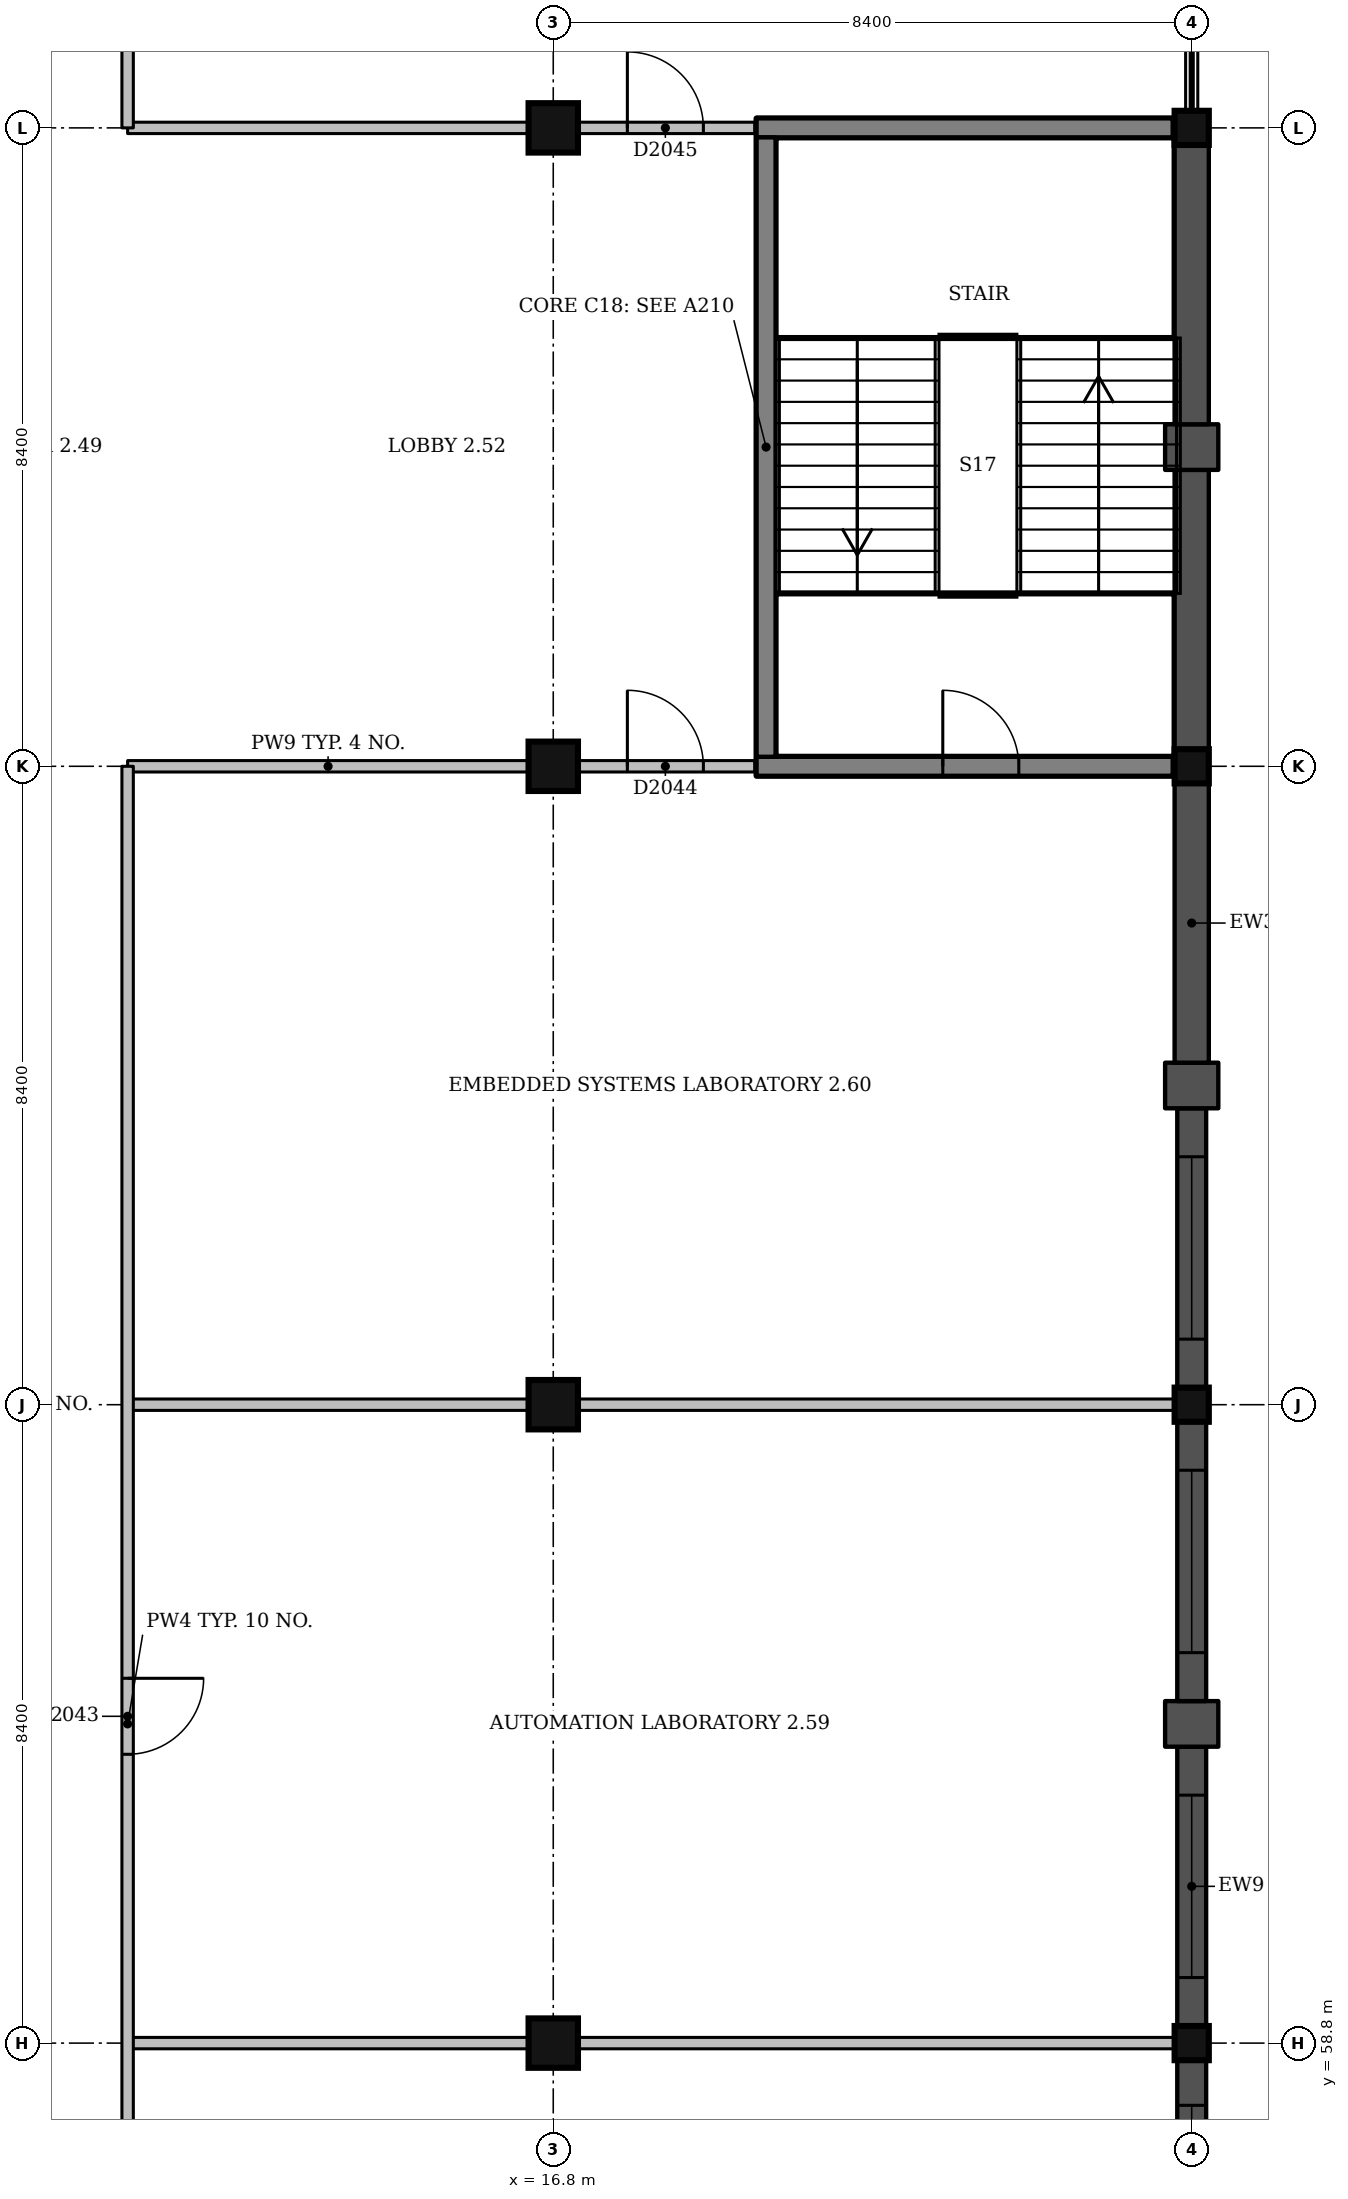
"""IFC4 building model, lengths in metres.
Left out: names, types, materials, properties, quantities, classifications, styles, units other than length and angle.
Written with IfcOpenShell. Run it as: python <this file> out.ifc"""

import sys

from ifc_helpers import new_model, si_unit, direction, frame, frame_2d, origin, origin_2d, place, context, subcontext, project, spatial, rectangle, extrude, element, fill, save


model = new_model("IFC4")
c1 = context("Model", 3, precision=1e-05, world=origin(), true_north=direction((0.0, 1.0)))
c2 = subcontext(c1, "Body", "Model", "MODEL_VIEW")
j1 = project(units=[si_unit("LENGTHUNIT", "METRE"), si_unit("PLANEANGLEUNIT", "RADIAN")], contexts=[c1])
p1 = place(None, origin())
s1 = spatial("IfcSite", under=j1, at=p1, CompositionType="ELEMENT")
p2 = place(p1, origin())
s2 = spatial("IfcBuilding", under=s1, at=p2, CompositionType="ELEMENT")
p3 = place(p2, frame((0.0, 0.0, 9.0)))
s3 = spatial("IfcBuildingStorey", under=s2, at=p3, CompositionType="ELEMENT", Elevation=9.0)
for number, where, z_axis, x_axis in (
    (1, (16.8, 58.8, 0.0), (0.0, 0.0, 1.0), (1.0, 0.0, 0.0)),
    (2, (16.8, 67.2, 0.0), (0.0, 0.0, 1.0), (1.0, 0.0, 0.0)),
    (3, (16.8, 75.6, 0.0), (0.0, 0.0, 1.0), (1.0, 0.0, 0.0)),
    (4, (16.8, 84.0, 0.0), (0.0, 0.0, 1.0), (1.0, 0.0, 0.0)),
):
    element("IfcColumn", number, at=place(p3, frame(where, z_axis=z_axis, x_axis=x_axis)), inside=s3, PredefinedType="COLUMN", context=c2, shape_type="SweptSolid", body=[
        extrude(rectangle(XDim=0.65, YDim=0.65, at=origin_2d()), origin(), (0.0, 0.0, 1.0), 4.5),
    ])
for number, where, z_axis, x_axis in (
    (5, (25.2, 58.8, 0.0), (0.0, 0.0, 1.0), (1.0, 0.0, 0.0)),
    (6, (25.2, 67.2, 0.0), (0.0, 0.0, 1.0), (1.0, 0.0, 0.0)),
    (7, (25.2, 75.6, 0.0), (0.0, 0.0, 1.0), (1.0, 0.0, 0.0)),
    (8, (25.2, 84.0, 0.0), (0.0, 0.0, 1.0), (1.0, 0.0, 0.0)),
):
    element("IfcColumn", number, at=place(p3, frame(where, z_axis=z_axis, x_axis=x_axis)), inside=s3, PredefinedType="COLUMN", context=c2, shape_type="SweptSolid", body=[
        extrude(rectangle(XDim=0.45, YDim=0.45, at=origin_2d()), origin(), (0.0, 0.0, 1.0), 4.5),
    ])
p4 = place(p3, frame((19.475, 75.6, 0.0), z_axis=(0.0, 0.0, 1.0), x_axis=(1.0, 0.0, 0.0)))
e9 = element("IfcWall", 9, at=p4, inside=s3, PredefinedType="SHEAR", context=c2, shape_type="SweptSolid", body=[
    extrude(rectangle(XDim=5.475, YDim=0.25, at=frame_2d((2.737, 0.0))), origin(), (0.0, 0.0, 1.0), 4.5),
])
p5 = place(p4, frame((2.45, 0.0, 0.0)))
e10 = element("IfcOpeningElement", 10, at=p5, cuts=e9, PredefinedType="OPENING", context=c2, shape_type="SweptSolid", body=[
    extrude(rectangle(XDim=1.0, YDim=2.1, at=frame_2d((0.5, 1.05))), frame((0.0, 0.135, 0.0), z_axis=(0.0, -1.0, 0.0), x_axis=(1.0, 0.0, 0.0)), (0.0, 0.0, 1.0), 0.27),
])
p6 = place(p3, frame((19.475, 84.0, 0.0), z_axis=(0.0, 0.0, 1.0), x_axis=(1.0, 0.0, 0.0)))
e11 = element("IfcWall", 11, at=p6, inside=s3, PredefinedType="SHEAR", context=c2, shape_type="SweptSolid", body=[
    extrude(rectangle(XDim=5.475, YDim=0.25, at=frame_2d((2.737, 0.0))), origin(), (0.0, 0.0, 1.0), 4.5),
])
p7 = place(p3, frame((19.6, 75.725, 0.0), z_axis=(0.0, 0.0, 1.0), x_axis=(0.0, 1.0, 0.0)))
e12 = element("IfcWall", 12, at=p7, inside=s3, PredefinedType="SHEAR", context=c2, shape_type="SweptSolid", body=[
    extrude(rectangle(XDim=8.15, YDim=0.25, at=frame_2d((4.075, 0.0))), origin(), (0.0, 0.0, 1.0), 4.5),
])
p8 = place(p3, frame((25.2, 54.988, 0.0), z_axis=(0.0, 0.0, 1.0), x_axis=(0.0, 1.0, 0.0)))
e13 = element("IfcWall", 13, at=p8, inside=s3, PredefinedType="SOLIDWALL", context=c2, shape_type="SweptSolid", body=[
    extrude(rectangle(XDim=3.587, YDim=0.38, at=frame_2d((1.794, 0.0))), origin(), (0.0, 0.0, 1.0), 4.2),
])
p9 = place(p8, frame((0.594, 0.0, 1.2)))
e14 = element("IfcOpeningElement", 14, at=p9, cuts=e13, PredefinedType="OPENING", context=c2, shape_type="SweptSolid", body=[
    extrude(rectangle(XDim=2.4, YDim=1.5, at=frame_2d((1.2, 0.75))), frame((0.0, 0.2, 0.0), z_axis=(0.0, -1.0, 0.0), x_axis=(1.0, 0.0, 0.0)), (0.0, 0.0, 1.0), 0.4),
])
p10 = place(p3, frame((25.2, 59.025, 0.0), z_axis=(0.0, 0.0, 1.0), x_axis=(0.0, 1.0, 0.0)))
e15 = element("IfcWall", 15, at=p10, inside=s3, PredefinedType="SOLIDWALL", context=c2, shape_type="SweptSolid", body=[
    extrude(rectangle(XDim=3.675, YDim=0.38, at=frame_2d((1.837, 0.0))), origin(), (0.0, 0.0, 1.0), 3.35),
])
p11 = place(p10, frame((0.637, 0.0, 1.2)))
e16 = element("IfcOpeningElement", 16, at=p11, cuts=e15, PredefinedType="OPENING", context=c2, shape_type="SweptSolid", body=[
    extrude(rectangle(XDim=2.4, YDim=1.5, at=frame_2d((1.2, 0.75))), frame((0.0, 0.2, 0.0), z_axis=(0.0, -1.0, 0.0), x_axis=(1.0, 0.0, 0.0)), (0.0, 0.0, 1.0), 0.4),
])
p12 = place(p3, frame((25.2, 62.7, 0.0), z_axis=(0.0, 0.0, 1.0), x_axis=(0.0, 1.0, 0.0)))
e17 = element("IfcWall", 17, at=p12, inside=s3, PredefinedType="SOLIDWALL", context=c2, shape_type="SweptSolid", body=[
    extrude(rectangle(XDim=0.6, YDim=0.7, at=frame_2d((0.3, 0.0))), origin(), (0.0, 0.0, 1.0), 3.35),
])
p13 = place(p3, frame((25.2, 63.3, 0.0), z_axis=(0.0, 0.0, 1.0), x_axis=(0.0, 1.0, 0.0)))
e18 = element("IfcWall", 18, at=p13, inside=s3, PredefinedType="SOLIDWALL", context=c2, shape_type="SweptSolid", body=[
    extrude(rectangle(XDim=3.675, YDim=0.38, at=frame_2d((1.837, 0.0))), origin(), (0.0, 0.0, 1.0), 3.35),
])
p14 = place(p13, frame((0.637, 0.0, 1.2)))
e19 = element("IfcOpeningElement", 19, at=p14, cuts=e18, PredefinedType="OPENING", context=c2, shape_type="SweptSolid", body=[
    extrude(rectangle(XDim=2.4, YDim=1.5, at=frame_2d((1.2, 0.75))), frame((0.0, 0.2, 0.0), z_axis=(0.0, -1.0, 0.0), x_axis=(1.0, 0.0, 0.0)), (0.0, 0.0, 1.0), 0.4),
])
p15 = place(p3, frame((25.2, 67.425, 0.0), z_axis=(0.0, 0.0, 1.0), x_axis=(0.0, 1.0, 0.0)))
e20 = element("IfcWall", 20, at=p15, inside=s3, PredefinedType="SOLIDWALL", context=c2, shape_type="SweptSolid", body=[
    extrude(rectangle(XDim=3.675, YDim=0.38, at=frame_2d((1.837, 0.0))), origin(), (0.0, 0.0, 1.0), 3.35),
])
p16 = place(p15, frame((0.637, 0.0, 1.2)))
e21 = element("IfcOpeningElement", 21, at=p16, cuts=e20, PredefinedType="OPENING", context=c2, shape_type="SweptSolid", body=[
    extrude(rectangle(XDim=2.4, YDim=1.5, at=frame_2d((1.2, 0.75))), frame((0.0, 0.2, 0.0), z_axis=(0.0, -1.0, 0.0), x_axis=(1.0, 0.0, 0.0)), (0.0, 0.0, 1.0), 0.4),
])
p17 = place(p3, frame((25.2, 71.1, 0.0), z_axis=(0.0, 0.0, 1.0), x_axis=(0.0, 1.0, 0.0)))
e22 = element("IfcWall", 22, at=p17, inside=s3, PredefinedType="SOLIDWALL", context=c2, shape_type="SweptSolid", body=[
    extrude(rectangle(XDim=0.6, YDim=0.7, at=frame_2d((0.3, 0.0))), origin(), (0.0, 0.0, 1.0), 3.35),
])
p18 = place(p3, frame((25.2, 71.7, 0.0), z_axis=(0.0, 0.0, 1.0), x_axis=(0.0, 1.0, 0.0)))
e23 = element("IfcWall", 23, at=p18, inside=s3, PredefinedType="SOLIDWALL", context=c2, shape_type="SweptSolid", body=[
    extrude(rectangle(XDim=3.675, YDim=0.45, at=frame_2d((1.837, 0.0))), origin(), (0.0, 0.0, 1.0), 3.35),
])
p19 = place(p3, frame((25.2, 75.825, 0.0), z_axis=(0.0, 0.0, 1.0), x_axis=(0.0, 1.0, 0.0)))
e24 = element("IfcWall", 24, at=p19, inside=s3, PredefinedType="SOLIDWALL", context=c2, shape_type="SweptSolid", body=[
    extrude(rectangle(XDim=3.675, YDim=0.45, at=frame_2d((1.837, 0.0))), origin(), (0.0, 0.0, 1.0), 3.65),
])
p20 = place(p3, frame((25.2, 79.5, 0.0), z_axis=(0.0, 0.0, 1.0), x_axis=(0.0, 1.0, 0.0)))
e25 = element("IfcWall", 25, at=p20, inside=s3, PredefinedType="SOLIDWALL", context=c2, shape_type="SweptSolid", body=[
    extrude(rectangle(XDim=0.6, YDim=0.7, at=frame_2d((0.3, 0.0))), origin(), (0.0, 0.0, 1.0), 3.65),
])
p21 = place(p3, frame((25.2, 80.1, 0.0), z_axis=(0.0, 0.0, 1.0), x_axis=(0.0, 1.0, 0.0)))
e26 = element("IfcWall", 26, at=p21, inside=s3, PredefinedType="SOLIDWALL", context=c2, shape_type="SweptSolid", body=[
    extrude(rectangle(XDim=3.675, YDim=0.45, at=frame_2d((1.837, 0.0))), origin(), (0.0, 0.0, 1.0), 3.65),
])
p22 = place(p3, frame((11.2, 58.8, 0.0), z_axis=(0.0, 0.0, 1.0), x_axis=(1.0, 0.0, 0.0)))
e27 = element("IfcWall", 27, at=p22, inside=s3, PredefinedType="PARTITIONING", context=c2, shape_type="SweptSolid", body=[
    extrude(rectangle(XDim=5.275, YDim=0.15, at=frame_2d((2.638, 0.0))), origin(), (0.0, 0.0, 1.0), 3.4),
])
p23 = place(p3, frame((17.125, 58.8, 0.0), z_axis=(0.0, 0.0, 1.0), x_axis=(1.0, 0.0, 0.0)))
e28 = element("IfcWall", 28, at=p23, inside=s3, PredefinedType="PARTITIONING", context=c2, shape_type="SweptSolid", body=[
    extrude(rectangle(XDim=7.85, YDim=0.15, at=frame_2d((3.925, 0.0))), origin(), (0.0, 0.0, 1.0), 3.4),
])
p24 = place(p3, frame((11.2, 67.2, 0.0), z_axis=(0.0, 0.0, 1.0), x_axis=(1.0, 0.0, 0.0)))
e29 = element("IfcWall", 29, at=p24, inside=s3, PredefinedType="PARTITIONING", context=c2, shape_type="SweptSolid", body=[
    extrude(rectangle(XDim=5.275, YDim=0.15, at=frame_2d((2.638, 0.0))), origin(), (0.0, 0.0, 1.0), 3.4),
])
p25 = place(p3, frame((17.125, 67.2, 0.0), z_axis=(0.0, 0.0, 1.0), x_axis=(1.0, 0.0, 0.0)))
e30 = element("IfcWall", 30, at=p25, inside=s3, PredefinedType="PARTITIONING", context=c2, shape_type="SweptSolid", body=[
    extrude(rectangle(XDim=7.85, YDim=0.15, at=frame_2d((3.925, 0.0))), origin(), (0.0, 0.0, 1.0), 3.4),
])
p26 = place(p3, frame((11.2, 75.6, 0.0), z_axis=(0.0, 0.0, 1.0), x_axis=(1.0, 0.0, 0.0)))
e31 = element("IfcWall", 31, at=p26, inside=s3, PredefinedType="PARTITIONING", context=c2, shape_type="SweptSolid", body=[
    extrude(rectangle(XDim=5.275, YDim=0.15, at=frame_2d((2.638, 0.0))), origin(), (0.0, 0.0, 1.0), 3.4),
])
p27 = place(p3, frame((17.125, 75.6, 0.0), z_axis=(0.0, 0.0, 1.0), x_axis=(1.0, 0.0, 0.0)))
e32 = element("IfcWall", 32, at=p27, inside=s3, PredefinedType="PARTITIONING", context=c2, shape_type="SweptSolid", body=[
    extrude(rectangle(XDim=2.325, YDim=0.15, at=frame_2d((1.163, 0.0))), origin(), (0.0, 0.0, 1.0), 3.5),
])
p28 = place(p27, frame((0.65, 0.0, 0.0)))
e33 = element("IfcOpeningElement", 33, at=p28, cuts=e32, PredefinedType="OPENING", context=c2, shape_type="SweptSolid", body=[
    extrude(rectangle(XDim=1.0, YDim=2.1, at=frame_2d((0.5, 1.05))), frame((0.0, 0.085, 0.0), z_axis=(0.0, -1.0, 0.0), x_axis=(1.0, 0.0, 0.0)), (0.0, 0.0, 1.0), 0.17),
])
p29 = place(p3, frame((11.2, 84.0, 0.0), z_axis=(0.0, 0.0, 1.0), x_axis=(1.0, 0.0, 0.0)))
e34 = element("IfcWall", 34, at=p29, inside=s3, PredefinedType="PARTITIONING", context=c2, shape_type="SweptSolid", body=[
    extrude(rectangle(XDim=5.275, YDim=0.15, at=frame_2d((2.638, 0.0))), origin(), (0.0, 0.0, 1.0), 3.4),
])
p30 = place(p3, frame((17.125, 84.0, 0.0), z_axis=(0.0, 0.0, 1.0), x_axis=(1.0, 0.0, 0.0)))
e35 = element("IfcWall", 35, at=p30, inside=s3, PredefinedType="PARTITIONING", context=c2, shape_type="SweptSolid", body=[
    extrude(rectangle(XDim=2.325, YDim=0.15, at=frame_2d((1.163, 0.0))), origin(), (0.0, 0.0, 1.0), 3.5),
])
p31 = place(p30, frame((0.65, 0.0, 0.0)))
e36 = element("IfcOpeningElement", 36, at=p31, cuts=e35, PredefinedType="OPENING", context=c2, shape_type="SweptSolid", body=[
    extrude(rectangle(XDim=1.0, YDim=2.1, at=frame_2d((0.5, 1.05))), frame((0.0, 0.085, 0.0), z_axis=(0.0, -1.0, 0.0), x_axis=(1.0, 0.0, 0.0)), (0.0, 0.0, 1.0), 0.17),
])
p32 = place(p3, frame((11.2, 50.4, 0.0), z_axis=(0.0, 0.0, 1.0), x_axis=(0.0, 1.0, 0.0)))
e37 = element("IfcWall", 37, at=p32, inside=s3, PredefinedType="PARTITIONING", context=c2, shape_type="SweptSolid", body=[
    extrude(rectangle(XDim=25.2, YDim=0.15, at=frame_2d((12.6, 0.0))), origin(), (0.0, 0.0, 1.0), 2.37),
])
p33 = place(p32, frame((3.8, 0.0, 0.0)))
e38 = element("IfcOpeningElement", 38, at=p33, cuts=e37, PredefinedType="OPENING", context=c2, shape_type="SweptSolid", body=[
    extrude(rectangle(XDim=1.0, YDim=2.1, at=frame_2d((0.5, 1.05))), frame((0.0, 0.085, 0.0), z_axis=(0.0, -1.0, 0.0), x_axis=(1.0, 0.0, 0.0)), (0.0, 0.0, 1.0), 0.17),
])
p34 = place(p32, frame((12.2, 0.0, 0.0)))
e39 = element("IfcOpeningElement", 39, at=p34, cuts=e37, PredefinedType="OPENING", context=c2, shape_type="SweptSolid", body=[
    extrude(rectangle(XDim=1.0, YDim=2.1, at=frame_2d((0.5, 1.05))), frame((0.0, 0.085, 0.0), z_axis=(0.0, -1.0, 0.0), x_axis=(1.0, 0.0, 0.0)), (0.0, 0.0, 1.0), 0.17),
])
p35 = place(p3, frame((11.2, 84.0, 0.0), z_axis=(0.0, 0.0, 1.0), x_axis=(0.0, 1.0, 0.0)))
e40 = element("IfcWall", 40, at=p35, inside=s3, PredefinedType="PARTITIONING", context=c2, shape_type="SweptSolid", body=[
    extrude(rectangle(XDim=12.6, YDim=0.15, at=frame_2d((6.3, 0.0))), origin(), (0.0, 0.0, 1.0), 3.4),
])
p36 = place(p35, frame((10.1, 0.0, 0.0)))
e41 = element("IfcOpeningElement", 41, at=p36, cuts=e40, PredefinedType="OPENING", context=c2, shape_type="SweptSolid", body=[
    extrude(rectangle(XDim=1.0, YDim=2.1, at=frame_2d((0.5, 1.05))), frame((0.0, 0.085, 0.0), z_axis=(0.0, -1.0, 0.0), x_axis=(1.0, 0.0, 0.0)), (0.0, 0.0, 1.0), 0.17),
])
p37 = place(p9, origin())
e42 = element("IfcWindow", 42, at=p37, inside=s3, PartitioningType="SINGLE_PANEL", PredefinedType="WINDOW", context=c2, shape_type="SweptSolid", body=[
    extrude(rectangle(XDim=2.4, YDim=1.5, at=frame_2d((1.2, 0.75))), frame((0.0, 0.15, 0.0), z_axis=(0.0, -1.0, 0.0), x_axis=(1.0, 0.0, 0.0)), (0.0, 0.0, 1.0), 0.06),
])
fill(e14, e42)
p38 = place(p11, origin())
e43 = element("IfcWindow", 43, at=p38, inside=s3, PartitioningType="SINGLE_PANEL", PredefinedType="WINDOW", context=c2, shape_type="SweptSolid", body=[
    extrude(rectangle(XDim=2.4, YDim=1.5, at=frame_2d((1.2, 0.75))), frame((0.0, 0.15, 0.0), z_axis=(0.0, -1.0, 0.0), x_axis=(1.0, 0.0, 0.0)), (0.0, 0.0, 1.0), 0.06),
])
fill(e16, e43)
p39 = place(p14, origin())
e44 = element("IfcWindow", 44, at=p39, inside=s3, PartitioningType="SINGLE_PANEL", PredefinedType="WINDOW", context=c2, shape_type="SweptSolid", body=[
    extrude(rectangle(XDim=2.4, YDim=1.5, at=frame_2d((1.2, 0.75))), frame((0.0, 0.15, 0.0), z_axis=(0.0, -1.0, 0.0), x_axis=(1.0, 0.0, 0.0)), (0.0, 0.0, 1.0), 0.06),
])
fill(e19, e44)
p40 = place(p16, origin())
e45 = element("IfcWindow", 45, at=p40, inside=s3, PartitioningType="SINGLE_PANEL", PredefinedType="WINDOW", context=c2, shape_type="SweptSolid", body=[
    extrude(rectangle(XDim=2.4, YDim=1.5, at=frame_2d((1.2, 0.75))), frame((0.0, 0.15, 0.0), z_axis=(0.0, -1.0, 0.0), x_axis=(1.0, 0.0, 0.0)), (0.0, 0.0, 1.0), 0.06),
])
fill(e21, e45)
p41 = place(p34, origin())
e46 = element("IfcDoor", 46, at=p41, inside=s3, OperationType="SINGLE_SWING_RIGHT", PredefinedType="DOOR", context=c2, shape_type="SweptSolid", body=[
    extrude(rectangle(XDim=1.0, YDim=2.1, at=frame_2d((0.5, 1.05))), frame((0.0, 0.025, 0.0), z_axis=(0.0, -1.0, 0.0), x_axis=(1.0, 0.0, 0.0)), (0.0, 0.0, 1.0), 0.05),
])
fill(e39, e46)
p42 = place(p28, origin())
e47 = element("IfcDoor", 47, at=p42, inside=s3, OperationType="SINGLE_SWING_LEFT", PredefinedType="DOOR", context=c2, shape_type="SweptSolid", body=[
    extrude(rectangle(XDim=1.0, YDim=2.1, at=frame_2d((0.5, 1.05))), frame((0.0, 0.025, 0.0), z_axis=(0.0, -1.0, 0.0), x_axis=(1.0, 0.0, 0.0)), (0.0, 0.0, 1.0), 0.05),
])
fill(e33, e47)
p43 = place(p31, origin())
e48 = element("IfcDoor", 48, at=p43, inside=s3, OperationType="SINGLE_SWING_LEFT", PredefinedType="DOOR", context=c2, shape_type="SweptSolid", body=[
    extrude(rectangle(XDim=1.0, YDim=2.1, at=frame_2d((0.5, 1.05))), frame((0.0, 0.025, 0.0), z_axis=(0.0, -1.0, 0.0), x_axis=(1.0, 0.0, 0.0)), (0.0, 0.0, 1.0), 0.05),
])
fill(e36, e48)
p44 = place(p5, origin())
e49 = element("IfcDoor", 49, at=p44, inside=s3, OperationType="SINGLE_SWING_LEFT", PredefinedType="DOOR", context=c2, shape_type="SweptSolid", body=[
    extrude(rectangle(XDim=1.0, YDim=2.1, at=frame_2d((0.5, 1.05))), frame((0.0, 0.025, 0.0), z_axis=(0.0, -1.0, 0.0), x_axis=(1.0, 0.0, 0.0)), (0.0, 0.0, 1.0), 0.05),
])
fill(e10, e49)
save(model, sys.argv[1])
